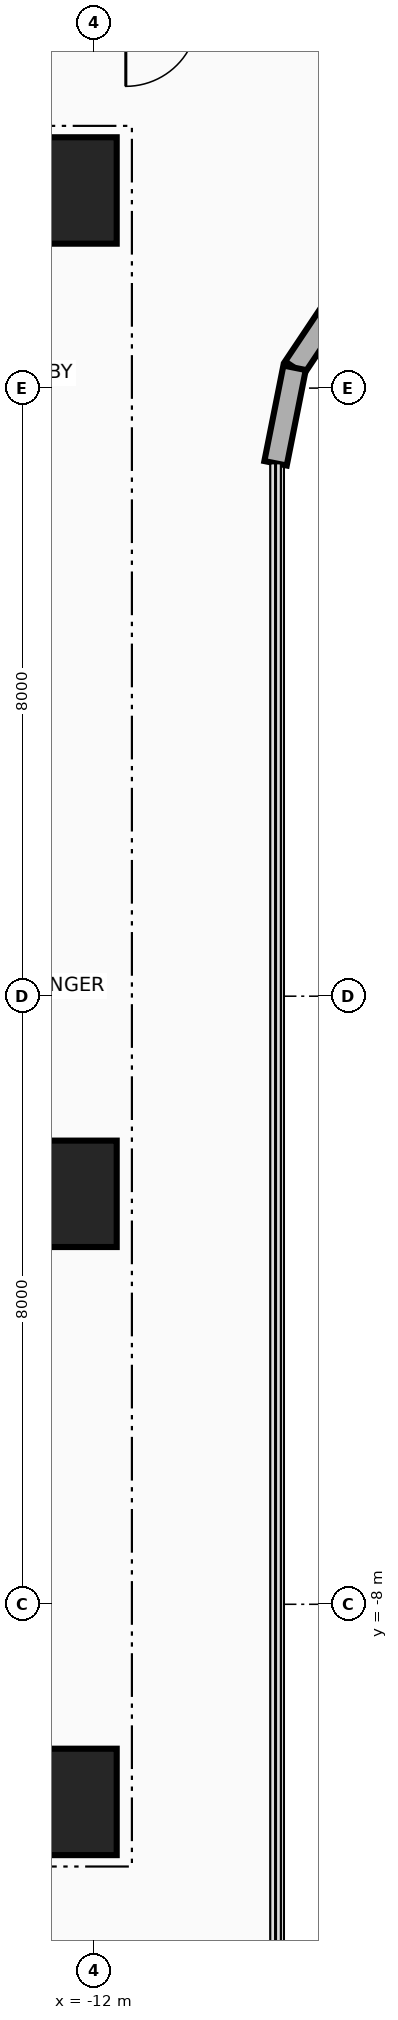
"""IFC4 building model, lengths in metres.
Left out: names, types, materials, properties, quantities, classifications, styles, units other than length and angle.
Written with IfcOpenShell. Run it as: python <this file> out.ifc"""

import sys

from ifc_helpers import new_model, si_unit, direction, frame, frame_2d, origin, origin_2d, place, context, subcontext, project, spatial, rectangle, extrude, source, transform, mapped, element, save


model = new_model("IFC4")
c1 = context("Model", 3, precision=1e-05, world=origin(), true_north=direction((0.0, 1.0)))
c2 = subcontext(c1, "Body", "Model", "MODEL_VIEW")
j1 = project(units=[si_unit("LENGTHUNIT", "METRE"), si_unit("PLANEANGLEUNIT", "RADIAN")], contexts=[c1])
p1 = place(None, origin())
s1 = spatial("IfcSite", under=j1, at=p1, CompositionType="ELEMENT")
p2 = place(p1, origin())
s2 = spatial("IfcBuilding", under=s1, at=p2, CompositionType="ELEMENT")
p3 = place(p2, frame((0.0, 0.0, 26.0)))
s3 = spatial("IfcBuildingStorey", under=s2, at=p3, CompositionType="ELEMENT", Elevation=26.0)
for number, where, z_axis, x_axis in (
    (1, (-22.65, 10.8, 0.0), (0.0, 0.0, 1.0), (1.0, 0.0, 0.0)),
    (2, (-22.65, -10.8, 0.0), (0.0, 0.0, 1.0), (1.0, 0.0, 0.0)),
):
    element("IfcWall", number, at=place(p3, frame(where, z_axis=z_axis, x_axis=x_axis)), inside=s3, PredefinedType="SHEAR", context=c2, shape_type="SweptSolid", body=[
        extrude(rectangle(XDim=10.25, YDim=0.7, at=frame_2d((5.125, 0.0))), origin(), (0.0, 0.0, 1.0), 3.46),
    ])
m1 = source(origin(), c2, "Body", "SweptSolid", [
    extrude(rectangle(XDim=1.4, YDim=1.4, at=origin_2d()), origin(), (0.0, 0.0, 1.0), 3.7),
])
for number, where, z_axis, x_axis in (
    (3, (-12.4, -10.6, 0.0), (0.0, 0.0, 1.0), (1.0, 0.0, 0.0)),
    (4, (-12.4, -2.6, 0.0), (0.0, 0.0, 1.0), (1.0, 0.0, 0.0)),
    (5, (-12.4, 10.6, 0.0), (0.0, 0.0, 1.0), (1.0, 0.0, 0.0)),
):
    element("IfcColumn", number, at=place(p3, frame(where, z_axis=z_axis, x_axis=x_axis)), inside=s3, PredefinedType="COLUMN", context=c2, shape_type="MappedRepresentation", body=[
        mapped(m1, transform((0.0, 0.0, 0.0), x_axis=(1.0, 0.0, 0.0), y_axis=(0.0, 1.0, 0.0), z_axis=(0.0, 0.0, 1.0), scale=1.0)),
    ])
p4 = place(p3, frame((-8.642, 9.342, 0.0), z_axis=(0.0, 0.0, 1.0), x_axis=(-0.555615398575, -0.831439431869, 0.0)))
e6 = element("IfcWall", 6, at=p4, inside=s3, PredefinedType="SOLIDWALL", context=c2, shape_type="SweptSolid", body=[
    extrude(rectangle(XDim=1.292, YDim=0.3, at=frame_2d((0.646, 0.0))), origin(), (0.0, 0.0, 1.0), 3.46),
])
p5 = place(p3, frame((-9.36, 8.268, 0.0), z_axis=(0.0, 0.0, 1.0), x_axis=(-0.195090163074, -0.980785312019, 0.0)))
e7 = element("IfcWall", 7, at=p5, inside=s3, PredefinedType="SOLIDWALL", context=c2, shape_type="SweptSolid", body=[
    extrude(rectangle(XDim=1.281, YDim=0.3, at=frame_2d((0.641, 0.0))), origin(), (0.0, 0.0, 1.0), 3.46),
])
save(model, sys.argv[1])
